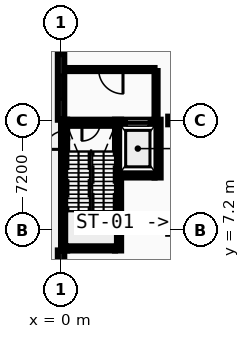
"""IFC4 building model, lengths in metres.
Left out: names, types, materials, properties, quantities, classifications, styles, units other than length and angle.
Written with IfcOpenShell. Run it as: python <this file> out.ifc"""

import sys

from ifc_helpers import new_model, si_unit, direction, frame, frame_2d, origin, origin_2d, place, context, subcontext, project, spatial, rectangle, i_section, extrude, element, fill, save


model = new_model("IFC4")
c1 = context("Model", 3, precision=1e-05, world=origin(), true_north=direction((0.0, 1.0)))
c2 = subcontext(c1, "Body", "Model", "MODEL_VIEW")
j1 = project(units=[si_unit("LENGTHUNIT", "METRE"), si_unit("PLANEANGLEUNIT", "RADIAN")], contexts=[c1])
p1 = place(None, origin())
s1 = spatial("IfcSite", under=j1, at=p1, CompositionType="ELEMENT")
p2 = place(p1, origin())
s2 = spatial("IfcBuilding", under=s1, at=p2, CompositionType="ELEMENT")
p3 = place(p2, origin())
s3 = spatial("IfcBuildingStorey", under=s2, at=p3, CompositionType="ELEMENT", Elevation=0.0)
for number, where, z_axis, x_axis in (
    (1, (7.2, 7.2, 0.0), (0.0, 0.0, 1.0), (1.0, 0.0, 0.0)),
    (2, (7.2, 14.4, 0.0), (0.0, 0.0, 1.0), (1.0, 0.0, 0.0)),
):
    element("IfcColumn", number, at=place(p3, frame(where, z_axis=z_axis, x_axis=x_axis)), inside=s3, PredefinedType="COLUMN", context=c2, shape_type="SweptSolid", body=[
        extrude(i_section(OverallWidth=0.3, OverallDepth=0.5, WebThickness=0.014, FlangeThickness=0.028, FilletRadius=0.027, at=origin_2d()), origin(), (0.0, 0.0, 1.0), 5.2),
    ])
p4 = place(p3, frame((0.0, 5.85, 0.0), z_axis=(0.0, 0.0, 1.0), x_axis=(0.0, -1.0, 0.0)))
e3 = element("IfcWall", 3, at=p4, inside=s3, PredefinedType="STANDARD", context=c2, shape_type="SweptSolid", body=[
    extrude(rectangle(XDim=5.64, YDim=0.42, at=frame_2d((2.82, 0.0))), origin(), (0.0, 0.0, 1.0), 4.97),
])
p5 = place(p4, frame((1.77, 0.0, 1.0)))
e4 = element("IfcOpeningElement", 4, at=p5, cuts=e3, PredefinedType="OPENING", context=c2, shape_type="SweptSolid", body=[
    extrude(rectangle(XDim=2.1, YDim=1.7, at=frame_2d((1.05, 0.85))), frame((0.0, 0.22, 0.0), z_axis=(0.0, -1.0, 0.0), x_axis=(1.0, 0.0, 0.0)), (0.0, 0.0, 1.0), 0.44),
])
p6 = place(p3, frame((0.0, 21.6, 0.0), z_axis=(0.0, 0.0, 1.0), x_axis=(0.0, -1.0, 0.0)))
e5 = element("IfcWall", 5, at=p6, inside=s3, PredefinedType="STANDARD", context=c2, shape_type="SweptSolid", body=[
    extrude(rectangle(XDim=7.15, YDim=0.42, at=frame_2d((3.575, 0.0))), origin(), (0.0, 0.0, 1.0), 4.97),
])
p7 = place(p6, frame((1.345, 0.0, 1.2)))
e6 = element("IfcOpeningElement", 6, at=p7, cuts=e5, PredefinedType="OPENING", context=c2, shape_type="SweptSolid", body=[
    extrude(rectangle(XDim=1.6, YDim=1.4, at=frame_2d((0.8, 0.7))), frame((0.0, 0.22, 0.0), z_axis=(0.0, -1.0, 0.0), x_axis=(1.0, 0.0, 0.0)), (0.0, 0.0, 1.0), 0.44),
])
p8 = place(p6, frame((4.205, 0.0, 1.2)))
e7 = element("IfcOpeningElement", 7, at=p8, cuts=e5, PredefinedType="OPENING", context=c2, shape_type="SweptSolid", body=[
    extrude(rectangle(XDim=1.6, YDim=1.4, at=frame_2d((0.8, 0.7))), frame((0.0, 0.22, 0.0), z_axis=(0.0, -1.0, 0.0), x_axis=(1.0, 0.0, 0.0)), (0.0, 0.0, 1.0), 0.44),
])
p9 = place(p3, frame((0.4, 6.05, 0.0), z_axis=(0.0, 0.0, 1.0), x_axis=(1.0, 0.0, 0.0)))
e8 = element("IfcWall", 8, at=p9, inside=s3, PredefinedType="SHEAR", context=c2, shape_type="SweptSolid", body=[
    extrude(rectangle(XDim=3.15, YDim=0.4, at=frame_2d((1.575, 0.0))), origin(), (0.0, 0.0, 1.0), 4.97),
])
p10 = place(p3, frame((0.4, 14.25, 0.0), z_axis=(0.0, 0.0, 1.0), x_axis=(1.0, 0.0, 0.0)))
e9 = element("IfcWall", 9, at=p10, inside=s3, PredefinedType="SHEAR", context=c2, shape_type="SweptSolid", body=[
    extrude(rectangle(XDim=3.15, YDim=0.4, at=frame_2d((1.575, 0.0))), origin(), (0.0, 0.0, 1.0), 4.97),
])
p11 = place(p10, frame((0.975, 0.0, 0.0)))
e10 = element("IfcOpeningElement", 10, at=p11, cuts=e9, PredefinedType="OPENING", context=c2, shape_type="SweptSolid", body=[
    extrude(rectangle(XDim=1.2, YDim=2.15, at=frame_2d((0.6, 1.075))), frame((0.0, 0.21, 0.0), z_axis=(0.0, -1.0, 0.0), x_axis=(1.0, 0.0, 0.0)), (0.0, 0.0, 1.0), 0.42),
])
p12 = place(p3, frame((0.2, 5.85, 0.0), z_axis=(0.0, 0.0, 1.0), x_axis=(0.0, 1.0, 0.0)))
e11 = element("IfcWall", 11, at=p12, inside=s3, PredefinedType="SHEAR", context=c2, shape_type="SweptSolid", body=[
    extrude(rectangle(XDim=8.6, YDim=0.4, at=frame_2d((4.3, 0.0))), origin(), (0.0, 0.0, 1.0), 4.97),
])
p13 = place(p12, frame((6.65, 0.0, 0.0)))
e12 = element("IfcOpeningElement", 12, at=p13, cuts=e11, PredefinedType="OPENING", context=c2, shape_type="SweptSolid", body=[
    extrude(rectangle(XDim=1.2, YDim=2.15, at=frame_2d((0.6, 1.075))), frame((0.0, 0.21, 0.0), z_axis=(0.0, -1.0, 0.0), x_axis=(1.0, 0.0, 0.0)), (0.0, 0.0, 1.0), 0.42),
])
p14 = place(p3, frame((3.75, 5.85, 0.0), z_axis=(0.0, 0.0, 1.0), x_axis=(0.0, 1.0, 0.0)))
e13 = element("IfcWall", 13, at=p14, inside=s3, PredefinedType="SHEAR", context=c2, shape_type="SweptSolid", body=[
    extrude(rectangle(XDim=8.6, YDim=0.4, at=frame_2d((4.3, 0.0))), origin(), (0.0, 0.0, 1.0), 4.97),
])
p15 = place(p3, frame((3.95, 10.85, 0.0), z_axis=(0.0, 0.0, 1.0), x_axis=(1.0, 0.0, 0.0)))
e14 = element("IfcWall", 14, at=p15, inside=s3, PredefinedType="SHEAR", context=c2, shape_type="SweptSolid", body=[
    extrude(rectangle(XDim=2.2, YDim=0.4, at=frame_2d((1.1, 0.0))), origin(), (0.0, 0.0, 1.0), 4.97),
])
p16 = place(p3, frame((3.95, 14.25, 0.0), z_axis=(0.0, 0.0, 1.0), x_axis=(1.0, 0.0, 0.0)))
e15 = element("IfcWall", 15, at=p16, inside=s3, PredefinedType="SHEAR", context=c2, shape_type="SweptSolid", body=[
    extrude(rectangle(XDim=2.2, YDim=0.4, at=frame_2d((1.1, 0.0))), origin(), (0.0, 0.0, 1.0), 4.97),
])
p17 = place(p16, frame((0.4, 0.0, 0.0)))
e16 = element("IfcOpeningElement", 16, at=p17, cuts=e15, PredefinedType="OPENING", context=c2, shape_type="SweptSolid", body=[
    extrude(rectangle(XDim=1.4, YDim=2.2, at=frame_2d((0.7, 1.1))), frame((0.0, 0.21, 0.0), z_axis=(0.0, -1.0, 0.0), x_axis=(1.0, 0.0, 0.0)), (0.0, 0.0, 1.0), 0.42),
])
p18 = place(p3, frame((6.35, 10.65, 0.0), z_axis=(0.0, 0.0, 1.0), x_axis=(0.0, 1.0, 0.0)))
e17 = element("IfcWall", 17, at=p18, inside=s3, PredefinedType="SHEAR", context=c2, shape_type="SweptSolid", body=[
    extrude(rectangle(XDim=3.8, YDim=0.4, at=frame_2d((1.9, 0.0))), origin(), (0.0, 0.0, 1.0), 4.97),
])
p19 = place(p3, frame((0.4, 17.75, 0.0), z_axis=(0.0, 0.0, 1.0), x_axis=(1.0, 0.0, 0.0)))
e18 = element("IfcWall", 18, at=p19, inside=s3, PredefinedType="PARTITIONING", context=c2, shape_type="SweptSolid", body=[
    extrude(rectangle(XDim=5.75, YDim=0.2, at=frame_2d((2.875, 0.0))), origin(), (0.0, 0.0, 1.0), 4.97),
])
p20 = place(p19, frame((2.075, 0.0, 0.0)))
e19 = element("IfcOpeningElement", 19, at=p20, cuts=e18, PredefinedType="OPENING", context=c2, shape_type="SweptSolid", body=[
    extrude(rectangle(XDim=1.6, YDim=2.2, at=frame_2d((0.8, 1.1))), frame((0.0, 0.11, 0.0), z_axis=(0.0, -1.0, 0.0), x_axis=(1.0, 0.0, 0.0)), (0.0, 0.0, 1.0), 0.22),
])
p21 = place(p3, frame((6.25, 14.45, 0.0), z_axis=(0.0, 0.0, 1.0), x_axis=(0.0, 1.0, 0.0)))
e20 = element("IfcWall", 20, at=p21, inside=s3, PredefinedType="PARTITIONING", context=c2, shape_type="SweptSolid", body=[
    extrude(rectangle(XDim=3.2, YDim=0.2, at=frame_2d((1.6, 0.0))), origin(), (0.0, 0.0, 1.0), 4.97),
])
p22 = place(p7, origin())
e21 = element("IfcWindow", 21, at=p22, inside=s3, PartitioningType="SINGLE_PANEL", PredefinedType="WINDOW", context=c2, shape_type="SweptSolid", body=[
    extrude(rectangle(XDim=1.6, YDim=1.4, at=frame_2d((0.8, 0.7))), frame((0.0, 0.03, 0.0), z_axis=(0.0, -1.0, 0.0), x_axis=(1.0, 0.0, 0.0)), (0.0, 0.0, 1.0), 0.06),
])
fill(e6, e21)
p23 = place(p8, origin())
e22 = element("IfcWindow", 22, at=p23, inside=s3, PartitioningType="SINGLE_PANEL", PredefinedType="WINDOW", context=c2, shape_type="SweptSolid", body=[
    extrude(rectangle(XDim=1.6, YDim=1.4, at=frame_2d((0.8, 0.7))), frame((0.0, 0.03, 0.0), z_axis=(0.0, -1.0, 0.0), x_axis=(1.0, 0.0, 0.0)), (0.0, 0.0, 1.0), 0.06),
])
fill(e7, e22)
p24 = place(p11, frame((1.2, 0.0, 0.0), z_axis=(0.0, 0.0, 1.0), x_axis=(-1.0, 0.0, 0.0)))
e23 = element("IfcDoor", 23, at=p24, inside=s3, OperationType="SINGLE_SWING_LEFT", PredefinedType="DOOR", context=c2, shape_type="SweptSolid", body=[
    extrude(rectangle(XDim=1.2, YDim=2.15, at=frame_2d((0.6, 1.075))), frame((0.0, 0.025, 0.0), z_axis=(0.0, -1.0, 0.0), x_axis=(1.0, 0.0, 0.0)), (0.0, 0.0, 1.0), 0.05),
])
fill(e10, e23)
p25 = place(p13, origin())
e24 = element("IfcDoor", 24, at=p25, inside=s3, OperationType="SINGLE_SWING_LEFT", PredefinedType="DOOR", context=c2, shape_type="SweptSolid", body=[
    extrude(rectangle(XDim=1.2, YDim=2.15, at=frame_2d((0.6, 1.075))), frame((0.0, 0.025, 0.0), z_axis=(0.0, -1.0, 0.0), x_axis=(1.0, 0.0, 0.0)), (0.0, 0.0, 1.0), 0.05),
])
fill(e12, e24)
p26 = place(p17, origin())
e25 = element("IfcDoor", 25, at=p26, inside=s3, OperationType="SLIDING_TO_LEFT", PredefinedType="DOOR", context=c2, shape_type="SweptSolid", body=[
    extrude(rectangle(XDim=1.4, YDim=2.2, at=frame_2d((0.7, 1.1))), frame((0.0, 0.025, 0.0), z_axis=(0.0, -1.0, 0.0), x_axis=(1.0, 0.0, 0.0)), (0.0, 0.0, 1.0), 0.05),
])
fill(e16, e25)
p27 = place(p20, origin())
e26 = element("IfcDoor", 26, at=p27, inside=s3, OperationType="DOUBLE_DOOR_SINGLE_SWING", PredefinedType="DOOR", context=c2, shape_type="SweptSolid", body=[
    extrude(rectangle(XDim=1.6, YDim=2.2, at=frame_2d((0.8, 1.1))), frame((0.0, 0.025, 0.0), z_axis=(0.0, -1.0, 0.0), x_axis=(1.0, 0.0, 0.0)), (0.0, 0.0, 1.0), 0.05),
])
fill(e19, e26)
save(model, sys.argv[1])
